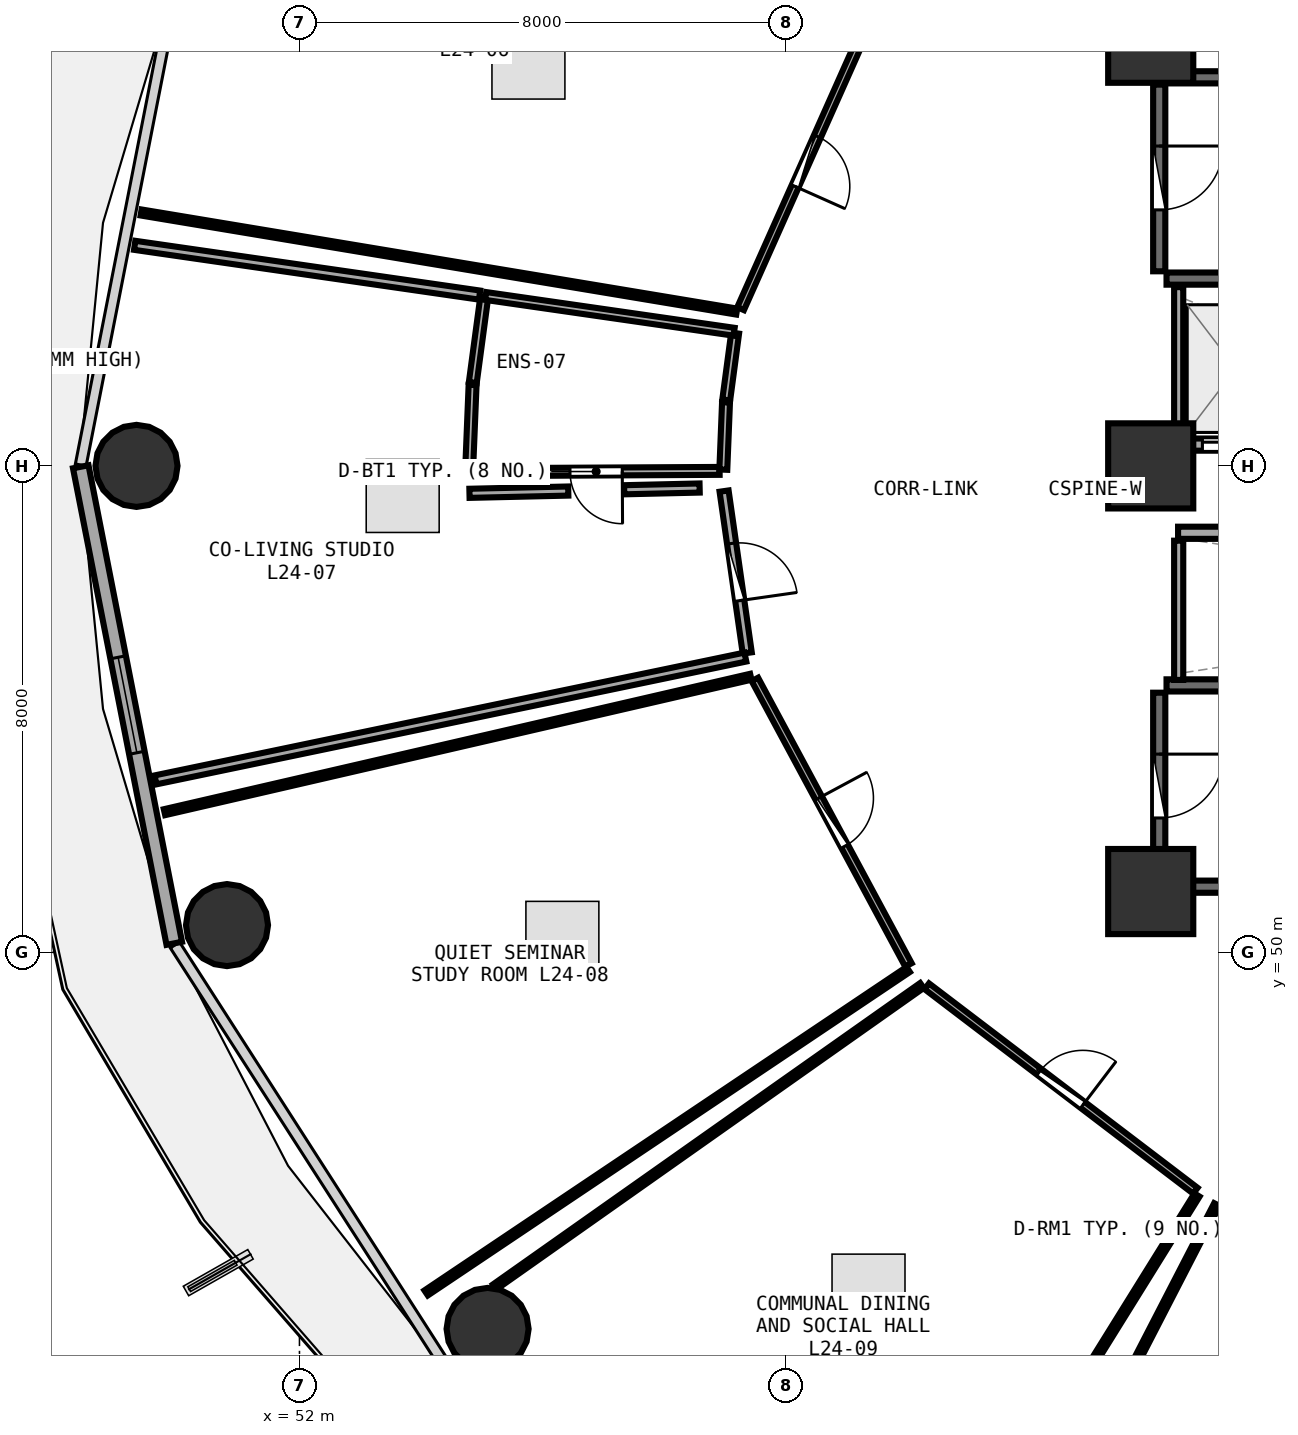
"""IFC4 building model, lengths in metres.
Left out: names, types, materials, properties, quantities, classifications, styles, units other than length and angle.
Written with IfcOpenShell. Run it as: python <this file> out.ifc"""

import sys

from ifc_helpers import new_model, si_unit, direction, frame, frame_2d, origin, origin_2d, place, context, subcontext, project, spatial, rectangle, circle, extrude, element, fill, save


model = new_model("IFC4")
c1 = context("Model", 3, precision=1e-05, world=origin(), true_north=direction((0.0, 1.0)))
c2 = subcontext(c1, "Body", "Model", "MODEL_VIEW")
j1 = project(units=[si_unit("LENGTHUNIT", "METRE"), si_unit("PLANEANGLEUNIT", "RADIAN")], contexts=[c1])
p1 = place(None, origin())
s1 = spatial("IfcSite", under=j1, at=p1, CompositionType="ELEMENT")
p2 = place(p1, origin())
s2 = spatial("IfcBuilding", under=s1, at=p2, CompositionType="ELEMENT")
p3 = place(p2, frame((0.0, 0.0, 95.1)))
s3 = spatial("IfcBuildingStorey", under=s2, at=p3, CompositionType="ELEMENT", Elevation=95.1)
for number, where, z_axis, x_axis in (
    (1, (66.0, 51.0, 0.0), (0.0, 0.0, 1.0), (1.0, 0.0, 0.0)),
    (2, (66.0, 65.0, 0.0), (0.0, 0.0, 1.0), (1.0, 0.0, 0.0)),
    (3, (66.0, 58.0, 0.0), (0.0, 0.0, 1.0), (1.0, 0.0, 0.0)),
):
    element("IfcColumn", number, at=place(p3, frame(where, z_axis=z_axis, x_axis=x_axis)), inside=s3, PredefinedType="PILASTER", context=c2, shape_type="SweptSolid", body=[
        extrude(rectangle(XDim=1.4, YDim=1.4, at=origin_2d()), origin(), (0.0, 0.0, 1.0), 3.75),
    ])
for number, where, z_axis, x_axis in (
    (4, (49.32, 58.0, 0.0), (0.0, 0.0, 1.0), (1.0, 0.0, 0.0)),
    (5, (50.808, 50.448, 0.0), (0.0, 0.0, 1.0), (1.0, 0.0, 0.0)),
    (6, (55.094, 43.807, 0.0), (0.0, 0.0, 1.0), (1.0, 0.0, 0.0)),
):
    element("IfcColumn", number, at=place(p3, frame(where, z_axis=z_axis, x_axis=x_axis)), inside=s3, PredefinedType="COLUMN", context=c2, shape_type="SweptSolid", body=[
        extrude(circle(Radius=0.675, at=origin_2d()), origin(), (0.0, 0.0, 1.0), 3.75),
    ])
p4 = place(p3, frame((48.403, 57.985, 0.0), z_axis=(0.0, 0.0, 1.0), x_axis=(0.192581843632, -0.981280914674, 0.0)))
e7 = element("IfcWall", 7, at=p4, inside=s3, PredefinedType="SOLIDWALL", context=c2, shape_type="SweptSolid", body=[
    extrude(rectangle(XDim=7.987, YDim=0.26, at=frame_2d((3.993, 0.0))), origin(), (0.0, 0.0, 1.0), 3.475),
])
p5 = place(p4, frame((3.193, 0.0, 0.85)))
e8 = element("IfcOpeningElement", 8, at=p5, cuts=e7, PredefinedType="OPENING", context=c2, shape_type="SweptSolid", body=[
    extrude(rectangle(XDim=1.6, YDim=1.45, at=frame_2d((0.8, 0.725))), frame((0.0, 0.14, 0.0), z_axis=(0.0, -1.0, 0.0), x_axis=(1.0, 0.0, 0.0)), (0.0, 0.0, 1.0), 0.28),
])
for number, where, z_axis, x_axis in (
    (9, (66.26, 61.08, 0.0), (0.0, 0.0, 1.0), (1.0, 0.0, 0.0)),
    (10, (73.42, 64.39, 0.0), (0.0, 0.0, 1.0), (-1.0, 0.0, 0.0)),
):
    element("IfcWall", number, at=place(p3, frame(where, z_axis=z_axis, x_axis=x_axis)), inside=s3, PredefinedType="SHEAR", context=c2, shape_type="SweptSolid", body=[
        extrude(rectangle(XDim=7.16, YDim=0.2, at=frame_2d((3.58, 0.0))), origin(), (0.0, 0.0, 1.0), 3.49),
    ])
p6 = place(p3, frame((66.14, 64.27, 0.0), z_axis=(0.0, 0.0, 1.0), x_axis=(0.0, -1.0, 0.0)))
e11 = element("IfcWall", 11, at=p6, inside=s3, PredefinedType="SHEAR", context=c2, shape_type="SweptSolid", body=[
    extrude(rectangle(XDim=3.07, YDim=0.2, at=frame_2d((1.535, 0.0))), origin(), (0.0, 0.0, 1.0), 3.49),
])
p7 = place(p6, frame((1.01, 0.0, 0.0)))
e12 = element("IfcOpeningElement", 12, at=p7, cuts=e11, PredefinedType="OPENING", context=c2, shape_type="SweptSolid", body=[
    extrude(rectangle(XDim=1.05, YDim=2.1, at=frame_2d((0.525, 1.05))), frame((0.0, 0.11, 0.0), z_axis=(0.0, -1.0, 0.0), x_axis=(1.0, 0.0, 0.0)), (0.0, 0.0, 1.0), 0.22),
])
for number, where, z_axis, x_axis in (
    (13, (66.26, 51.08, 0.0), (0.0, 0.0, 1.0), (1.0, 0.0, 0.0)),
    (14, (73.42, 54.39, 0.0), (0.0, 0.0, 1.0), (-1.0, 0.0, 0.0)),
):
    element("IfcWall", number, at=place(p3, frame(where, z_axis=z_axis, x_axis=x_axis)), inside=s3, PredefinedType="SHEAR", context=c2, shape_type="SweptSolid", body=[
        extrude(rectangle(XDim=7.16, YDim=0.2, at=frame_2d((3.58, 0.0))), origin(), (0.0, 0.0, 1.0), 3.49),
    ])
p8 = place(p3, frame((66.14, 54.27, 0.0), z_axis=(0.0, 0.0, 1.0), x_axis=(0.0, -1.0, 0.0)))
e15 = element("IfcWall", 15, at=p8, inside=s3, PredefinedType="SHEAR", context=c2, shape_type="SweptSolid", body=[
    extrude(rectangle(XDim=3.07, YDim=0.2, at=frame_2d((1.535, 0.0))), origin(), (0.0, 0.0, 1.0), 3.49),
])
p9 = place(p8, frame((1.01, 0.0, 0.0)))
e16 = element("IfcOpeningElement", 16, at=p9, cuts=e15, PredefinedType="OPENING", context=c2, shape_type="SweptSolid", body=[
    extrude(rectangle(XDim=1.05, YDim=2.1, at=frame_2d((0.525, 1.05))), frame((0.0, 0.11, 0.0), z_axis=(0.0, -1.0, 0.0), x_axis=(1.0, 0.0, 0.0)), (0.0, 0.0, 1.0), 0.22),
])
p10 = place(p3, frame((66.45, 58.35, 0.0), z_axis=(0.0, 0.0, 1.0), x_axis=(1.0, 0.0, 0.0)))
e17 = element("IfcWall", 17, at=p10, inside=s3, PredefinedType="SOLIDWALL", context=c2, shape_type="SweptSolid", body=[
    extrude(rectangle(XDim=6.0, YDim=0.2, at=frame_2d((3.0, 0.0))), origin(), (0.0, 0.0, 1.0), 3.48),
])
p11 = place(p10, frame((0.4, 0.0, 0.0)))
e18 = element("IfcOpeningElement", 18, at=p11, cuts=e17, PredefinedType="OPENING", context=c2, shape_type="SweptSolid", body=[
    extrude(rectangle(XDim=1.1, YDim=2.1, at=frame_2d((0.55, 1.05))), frame((0.0, 0.11, 0.0), z_axis=(0.0, -1.0, 0.0), x_axis=(1.0, 0.0, 0.0)), (0.0, 0.0, 1.0), 0.22),
])
p12 = place(p10, frame((2.4, 0.0, 0.0)))
e19 = element("IfcOpeningElement", 19, at=p12, cuts=e17, PredefinedType="OPENING", context=c2, shape_type="SweptSolid", body=[
    extrude(rectangle(XDim=1.1, YDim=2.1, at=frame_2d((0.55, 1.05))), frame((0.0, 0.11, 0.0), z_axis=(0.0, -1.0, 0.0), x_axis=(1.0, 0.0, 0.0)), (0.0, 0.0, 1.0), 0.22),
])
p13 = place(p10, frame((4.4, 0.0, 0.0)))
e20 = element("IfcOpeningElement", 20, at=p13, cuts=e17, PredefinedType="OPENING", context=c2, shape_type="SweptSolid", body=[
    extrude(rectangle(XDim=1.1, YDim=2.1, at=frame_2d((0.55, 1.05))), frame((0.0, 0.11, 0.0), z_axis=(0.0, -1.0, 0.0), x_axis=(1.0, 0.0, 0.0)), (0.0, 0.0, 1.0), 0.22),
])
p14 = place(p3, frame((66.46, 58.48, 0.0), z_axis=(0.0, 0.0, 1.0), x_axis=(0.0, 1.0, 0.0)))
e21 = element("IfcWall", 21, at=p14, inside=s3, PredefinedType="PARTITIONING", context=c2, shape_type="SweptSolid", body=[
    extrude(rectangle(XDim=2.46, YDim=0.15, at=frame_2d((1.23, 0.0))), origin(), (0.0, 0.0, 1.0), 3.48),
])
p15 = place(p3, frame((66.45, 56.9, 0.0), z_axis=(0.0, 0.0, 1.0), x_axis=(1.0, 0.0, 0.0)))
e22 = element("IfcWall", 22, at=p15, inside=s3, PredefinedType="SOLIDWALL", context=c2, shape_type="SweptSolid", body=[
    extrude(rectangle(XDim=14.4, YDim=0.2, at=frame_2d((7.2, 0.0))), origin(), (0.0, 0.0, 1.0), 3.48),
])
p16 = place(p3, frame((66.46, 54.48, 0.0), z_axis=(0.0, 0.0, 1.0), x_axis=(0.0, 1.0, 0.0)))
e23 = element("IfcWall", 23, at=p16, inside=s3, PredefinedType="PARTITIONING", context=c2, shape_type="SweptSolid", body=[
    extrude(rectangle(XDim=2.29, YDim=0.15, at=frame_2d((1.145, 0.0))), origin(), (0.0, 0.0, 1.0), 3.48),
])
p17 = place(p3, frame((61.414, 65.428, 0.0), z_axis=(0.0, 0.0, 1.0), x_axis=(-0.407078232177, -0.913393295841, 0.0)))
e24 = element("IfcWall", 24, at=p17, inside=s3, PredefinedType="PARTITIONING", context=c2, shape_type="SweptSolid", body=[
    extrude(rectangle(XDim=5.302, YDim=0.12, at=frame_2d((2.651, 0.0))), origin(), (0.0, 0.0, 1.0), 2.925),
])
p18 = place(p17, frame((2.201, 0.0, 0.0)))
e25 = element("IfcOpeningElement", 25, at=p18, cuts=e24, PredefinedType="OPENING", context=c2, shape_type="SweptSolid", body=[
    extrude(rectangle(XDim=0.9, YDim=2.08, at=frame_2d((0.45, 1.04))), frame((0.0, 0.07, 0.0), z_axis=(0.0, -1.0, 0.0), x_axis=(1.0, 0.0, 0.0)), (0.0, 0.0, 1.0), 0.14),
])
p19 = place(p3, frame((58.91, 57.918, 0.0), z_axis=(0.0, 0.0, 1.0), x_axis=(-0.999986004608, -0.005290613143, 0.0)))
e26 = element("IfcWall", 26, at=p19, inside=s3, PredefinedType="PLUMBINGWALL", context=c2, shape_type="SweptSolid", body=[
    extrude(rectangle(XDim=4.061, YDim=0.13, at=frame_2d((2.03, 0.0))), origin(), (0.0, 0.0, 1.0), 2.925),
])
p20 = place(p19, frame((1.601, 0.0, 0.0)))
e27 = element("IfcOpeningElement", 27, at=p20, cuts=e26, PredefinedType="OPENING", context=c2, shape_type="SweptSolid", body=[
    extrude(rectangle(XDim=0.86, YDim=2.05, at=frame_2d((0.43, 1.025))), frame((0.0, 0.075, 0.0), z_axis=(0.0, -1.0, 0.0), x_axis=(1.0, 0.0, 0.0)), (0.0, 0.0, 1.0), 0.15),
])
p21 = place(p3, frame((58.983, 57.586, 0.0), z_axis=(0.0, 0.0, 1.0), x_axis=(0.141700939895, -0.989909512851, 0.0)))
e28 = element("IfcWall", 28, at=p21, inside=s3, PredefinedType="PARTITIONING", context=c2, shape_type="SweptSolid", body=[
    extrude(rectangle(XDim=2.689, YDim=0.15, at=frame_2d((1.345, 0.0))), origin(), (0.0, 0.0, 1.0), 3.48),
])
p22 = place(p21, frame((0.87, 0.0, 0.0)))
e29 = element("IfcOpeningElement", 29, at=p22, cuts=e28, PredefinedType="OPENING", context=c2, shape_type="SweptSolid", body=[
    extrude(rectangle(XDim=0.95, YDim=2.08, at=frame_2d((0.475, 1.04))), frame((0.0, 0.085, 0.0), z_axis=(0.0, -1.0, 0.0), x_axis=(1.0, 0.0, 0.0)), (0.0, 0.0, 1.0), 0.17),
])
p23 = place(p3, frame((59.49, 54.488, 0.0), z_axis=(0.0, 0.0, 1.0), x_axis=(0.473630069111, -0.880723882743, 0.0)))
e30 = element("IfcWall", 30, at=p23, inside=s3, PredefinedType="PARTITIONING", context=c2, shape_type="SweptSolid", body=[
    extrude(rectangle(XDim=5.332, YDim=0.12, at=frame_2d((2.666, 0.0))), origin(), (0.0, 0.0, 1.0), 2.925),
])
p24 = place(p23, frame((2.216, 0.0, 0.0)))
e31 = element("IfcOpeningElement", 31, at=p24, cuts=e30, PredefinedType="OPENING", context=c2, shape_type="SweptSolid", body=[
    extrude(rectangle(XDim=0.9, YDim=2.08, at=frame_2d((0.45, 1.04))), frame((0.0, 0.07, 0.0), z_axis=(0.0, -1.0, 0.0), x_axis=(1.0, 0.0, 0.0)), (0.0, 0.0, 1.0), 0.14),
])
p25 = place(p3, frame((62.318, 49.442, 0.0), z_axis=(0.0, 0.0, 1.0), x_axis=(0.795762794985, -0.605608432997, 0.0)))
e32 = element("IfcWall", 32, at=p25, inside=s3, PredefinedType="PARTITIONING", context=c2, shape_type="SweptSolid", body=[
    extrude(rectangle(XDim=5.55, YDim=0.12, at=frame_2d((2.775, 0.0))), origin(), (0.0, 0.0, 1.0), 2.925),
])
p26 = place(p25, frame((2.325, 0.0, 0.0)))
e33 = element("IfcOpeningElement", 33, at=p26, cuts=e32, PredefinedType="OPENING", context=c2, shape_type="SweptSolid", body=[
    extrude(rectangle(XDim=0.9, YDim=2.08, at=frame_2d((0.45, 1.04))), frame((0.0, 0.07, 0.0), z_axis=(0.0, -1.0, 0.0), x_axis=(1.0, 0.0, 0.0)), (0.0, 0.0, 1.0), 0.14),
])
p27 = place(p3, frame((59.191, 60.538, 0.0), z_axis=(0.0, 0.0, 1.0), x_axis=(-0.986439069388, 0.16412788424, 0.0)))
e34 = element("IfcWall", 34, at=p27, inside=s3, PredefinedType="PARTITIONING", context=c2, shape_type="SweptSolid", body=[
    extrude(rectangle(XDim=9.931, YDim=0.1, at=frame_2d((4.965, 0.0))), origin(), (0.0, 0.0, 1.0), 2.975),
])
p28 = place(p3, frame((59.165, 60.183, 0.0), z_axis=(0.0, 0.0, 1.0), x_axis=(-0.132293485363, -0.991210590001, 0.0)))
e35 = element("IfcWall", 35, at=p28, inside=s3, PredefinedType="PLUMBINGWALL", context=c2, shape_type="SweptSolid", body=[
    extrude(rectangle(XDim=1.109, YDim=0.13, at=frame_2d((0.555, 0.0))), origin(), (0.0, 0.0, 1.0), 3.48),
])
p29 = place(p3, frame((59.015, 59.044, 0.0), z_axis=(0.0, 0.0, 1.0), x_axis=(-0.040144213929, -0.999193896142, 0.0)))
e36 = element("IfcWall", 36, at=p29, inside=s3, PredefinedType="PLUMBINGWALL", context=c2, shape_type="SweptSolid", body=[
    extrude(rectangle(XDim=1.107, YDim=0.13, at=frame_2d((0.553, 0.0))), origin(), (0.0, 0.0, 1.0), 2.925),
])
p30 = place(p3, frame((54.79, 57.916, 0.0), z_axis=(0.0, 0.0, 1.0), x_axis=(0.040511918217, 0.999179055266, 0.0)))
e37 = element("IfcWall", 37, at=p30, inside=s3, PredefinedType="PLUMBINGWALL", context=c2, shape_type="SweptSolid", body=[
    extrude(rectangle(XDim=1.416, YDim=0.13, at=frame_2d((0.708, 0.0))), origin(), (0.0, 0.0, 1.0), 2.925),
])
p31 = place(p3, frame((54.851, 59.371, 0.0), z_axis=(0.0, 0.0, 1.0), x_axis=(0.133008986947, 0.991114831587, 0.0)))
e38 = element("IfcWall", 38, at=p31, inside=s3, PredefinedType="PLUMBINGWALL", context=c2, shape_type="SweptSolid", body=[
    extrude(rectangle(XDim=1.419, YDim=0.13, at=frame_2d((0.709, 0.0))), origin(), (0.0, 0.0, 1.0), 3.48),
])
p32 = place(p3, frame((55.062, 60.794, 0.0), z_axis=(0.0, 0.0, 1.0), x_axis=(0.989792775484, -0.142514075094, 0.0)))
e39 = element("IfcWall", 39, at=p32, inside=s3, PredefinedType="PLUMBINGWALL", context=c2, shape_type="SweptSolid", body=[
    extrude(rectangle(XDim=4.129, YDim=0.13, at=frame_2d((2.064, 0.0))), origin(), (0.0, 0.0, 1.0), 3.175),
])
p33 = place(p3, frame((59.334, 54.856, 0.0), z_axis=(0.0, 0.0, 1.0), x_axis=(-0.979013610983, -0.203794871157, 0.0)))
e40 = element("IfcWall", 40, at=p33, inside=s3, PredefinedType="PARTITIONING", context=c2, shape_type="SweptSolid", body=[
    extrude(rectangle(XDim=9.91, YDim=0.15, at=frame_2d((4.955, 0.0))), origin(), (0.0, 0.0, 1.0), 2.975),
])
p34 = place(p3, frame((49.29, 61.627, 0.0), z_axis=(0.0, 0.0, 1.0), x_axis=(0.989748303042, -0.142822605444, 0.0)))
e41 = element("IfcWall", 41, at=p34, inside=s3, PredefinedType="PARTITIONING", context=c2, shape_type="SweptSolid", body=[
    extrude(rectangle(XDim=5.732, YDim=0.15, at=frame_2d((2.866, 0.0))), origin(), (0.0, 0.0, 1.0), 2.975),
])
p35 = place(p3, frame((54.796, 57.549, 0.0), z_axis=(0.0, 0.0, 1.0), x_axis=(0.999735829312, 0.022984159562, 0.0)))
e42 = element("IfcWall", 42, at=p35, inside=s3, PredefinedType="PARTITIONING", context=c2, shape_type="SweptSolid", body=[
    extrude(rectangle(XDim=1.625, YDim=0.15, at=frame_2d((0.812, 0.0))), origin(), (0.0, 0.0, 1.0), 3.175),
])
p36 = place(p3, frame((57.341, 57.607, 0.0), z_axis=(0.0, 0.0, 1.0), x_axis=(0.999735089114, 0.02301633322, 0.0)))
e43 = element("IfcWall", 43, at=p36, inside=s3, PredefinedType="PARTITIONING", context=c2, shape_type="SweptSolid", body=[
    extrude(rectangle(XDim=1.241, YDim=0.15, at=frame_2d((0.621, 0.0))), origin(), (0.0, 0.0, 1.0), 3.48),
])
p37 = place(p3, frame((62.011, 49.718, 0.0), z_axis=(0.0, 0.0, 1.0), x_axis=(-0.830433607217, -0.557117603388, 0.0)))
e44 = element("IfcWall", 44, at=p37, inside=s3, PredefinedType="PARTITIONING", context=c2, shape_type="SweptSolid", body=[
    extrude(rectangle(XDim=9.546, YDim=0.1, at=frame_2d((4.773, 0.0))), origin(), (0.0, 0.0, 1.0), 2.975),
])
p38 = place(p3, frame((49.78, 52.305, 0.0), z_axis=(0.0, 0.0, 1.0), x_axis=(0.9743529317, 0.225025252999, 0.0)))
e45 = element("IfcWall", 45, at=p38, inside=s3, PredefinedType="PARTITIONING", context=c2, shape_type="SweptSolid", body=[
    extrude(rectangle(XDim=9.897, YDim=0.1, at=frame_2d((4.948, 0.0))), origin(), (0.0, 0.0, 1.0), 2.975),
])
p39 = place(p3, frame((66.761, 46.01, 0.0), z_axis=(0.0, 0.0, 1.0), x_axis=(-0.528015738644, -0.849234584638, 0.0)))
e46 = element("IfcWall", 46, at=p39, inside=s3, PredefinedType="PARTITIONING", context=c2, shape_type="SweptSolid", body=[
    extrude(rectangle(XDim=8.338, YDim=0.1, at=frame_2d((4.169, 0.0))), origin(), (0.0, 0.0, 1.0), 3.175),
])
p40 = place(p3, frame((55.21, 44.498, 0.0), z_axis=(0.0, 0.0, 1.0), x_axis=(0.817133838915, 0.576447993578, 0.0)))
e47 = element("IfcWall", 47, at=p40, inside=s3, PredefinedType="PARTITIONING", context=c2, shape_type="SweptSolid", body=[
    extrude(rectangle(XDim=8.6, YDim=0.1, at=frame_2d((4.3, 0.0))), origin(), (0.0, 0.0, 1.0), 3.175),
])
p41 = place(p3, frame((65.382, 42.546, 0.0), z_axis=(0.0, 0.0, 1.0), x_axis=(0.458413879464, 0.888738834031, 0.0)))
e48 = element("IfcWall", 48, at=p41, inside=s3, PredefinedType="PARTITIONING", context=c2, shape_type="SweptSolid", body=[
    extrude(rectangle(XDim=3.72, YDim=0.1, at=frame_2d((1.86, 0.0))), origin(), (0.0, 0.0, 1.0), 3.175),
])
p42 = place(p5, origin())
e49 = element("IfcWindow", 49, at=p42, inside=s3, PartitioningType="SINGLE_PANEL", PredefinedType="WINDOW", context=c2, shape_type="SweptSolid", body=[
    extrude(rectangle(XDim=1.6, YDim=1.45, at=frame_2d((0.8, 0.725))), frame((0.0, 0.03, 0.0), z_axis=(0.0, -1.0, 0.0), x_axis=(1.0, 0.0, 0.0)), (0.0, 0.0, 1.0), 0.06),
])
fill(e8, e49)
p43 = place(p7, origin())
e50 = element("IfcDoor", 50, at=p43, inside=s3, OperationType="SINGLE_SWING_LEFT", PredefinedType="DOOR", context=c2, shape_type="SweptSolid", body=[
    extrude(rectangle(XDim=1.05, YDim=2.1, at=frame_2d((0.525, 1.05))), frame((0.0, 0.025, 0.0), z_axis=(0.0, -1.0, 0.0), x_axis=(1.0, 0.0, 0.0)), (0.0, 0.0, 1.0), 0.05),
])
fill(e12, e50)
p44 = place(p9, origin())
e51 = element("IfcDoor", 51, at=p44, inside=s3, OperationType="SINGLE_SWING_LEFT", PredefinedType="DOOR", context=c2, shape_type="SweptSolid", body=[
    extrude(rectangle(XDim=1.05, YDim=2.1, at=frame_2d((0.525, 1.05))), frame((0.0, 0.025, 0.0), z_axis=(0.0, -1.0, 0.0), x_axis=(1.0, 0.0, 0.0)), (0.0, 0.0, 1.0), 0.05),
])
fill(e16, e51)
p45 = place(p11, origin())
e52 = element("IfcDoor", 52, at=p45, inside=s3, OperationType="DOUBLE_DOOR_SLIDING", PredefinedType="DOOR", context=c2, shape_type="SweptSolid", body=[
    extrude(rectangle(XDim=1.1, YDim=2.1, at=frame_2d((0.55, 1.05))), frame((0.0, 0.025, 0.0), z_axis=(0.0, -1.0, 0.0), x_axis=(1.0, 0.0, 0.0)), (0.0, 0.0, 1.0), 0.05),
])
fill(e18, e52)
p46 = place(p18, origin())
e53 = element("IfcDoor", 53, at=p46, inside=s3, OperationType="SINGLE_SWING_RIGHT", PredefinedType="DOOR", context=c2, shape_type="SweptSolid", body=[
    extrude(rectangle(XDim=0.9, YDim=2.08, at=frame_2d((0.45, 1.04))), frame((0.0, 0.025, 0.0), z_axis=(0.0, -1.0, 0.0), x_axis=(1.0, 0.0, 0.0)), (0.0, 0.0, 1.0), 0.05),
])
fill(e25, e53)
p47 = place(p20, origin())
e54 = element("IfcDoor", 54, at=p47, inside=s3, OperationType="SINGLE_SWING_LEFT", PredefinedType="DOOR", context=c2, shape_type="SweptSolid", body=[
    extrude(rectangle(XDim=0.86, YDim=2.05, at=frame_2d((0.43, 1.025))), frame((0.0, 0.025, 0.0), z_axis=(0.0, -1.0, 0.0), x_axis=(1.0, 0.0, 0.0)), (0.0, 0.0, 1.0), 0.05),
])
fill(e27, e54)
p48 = place(p22, origin())
e55 = element("IfcDoor", 55, at=p48, inside=s3, OperationType="SINGLE_SWING_RIGHT", PredefinedType="DOOR", context=c2, shape_type="SweptSolid", body=[
    extrude(rectangle(XDim=0.95, YDim=2.08, at=frame_2d((0.475, 1.04))), frame((0.0, 0.025, 0.0), z_axis=(0.0, -1.0, 0.0), x_axis=(1.0, 0.0, 0.0)), (0.0, 0.0, 1.0), 0.05),
])
fill(e29, e55)
p49 = place(p24, origin())
e56 = element("IfcDoor", 56, at=p49, inside=s3, OperationType="SINGLE_SWING_LEFT", PredefinedType="DOOR", context=c2, shape_type="SweptSolid", body=[
    extrude(rectangle(XDim=0.9, YDim=2.08, at=frame_2d((0.45, 1.04))), frame((0.0, 0.025, 0.0), z_axis=(0.0, -1.0, 0.0), x_axis=(1.0, 0.0, 0.0)), (0.0, 0.0, 1.0), 0.05),
])
fill(e31, e56)
p50 = place(p26, origin())
e57 = element("IfcDoor", 57, at=p50, inside=s3, OperationType="SINGLE_SWING_RIGHT", PredefinedType="DOOR", context=c2, shape_type="SweptSolid", body=[
    extrude(rectangle(XDim=0.9, YDim=2.08, at=frame_2d((0.45, 1.04))), frame((0.0, 0.025, 0.0), z_axis=(0.0, -1.0, 0.0), x_axis=(1.0, 0.0, 0.0)), (0.0, 0.0, 1.0), 0.05),
])
fill(e33, e57)
save(model, sys.argv[1])
